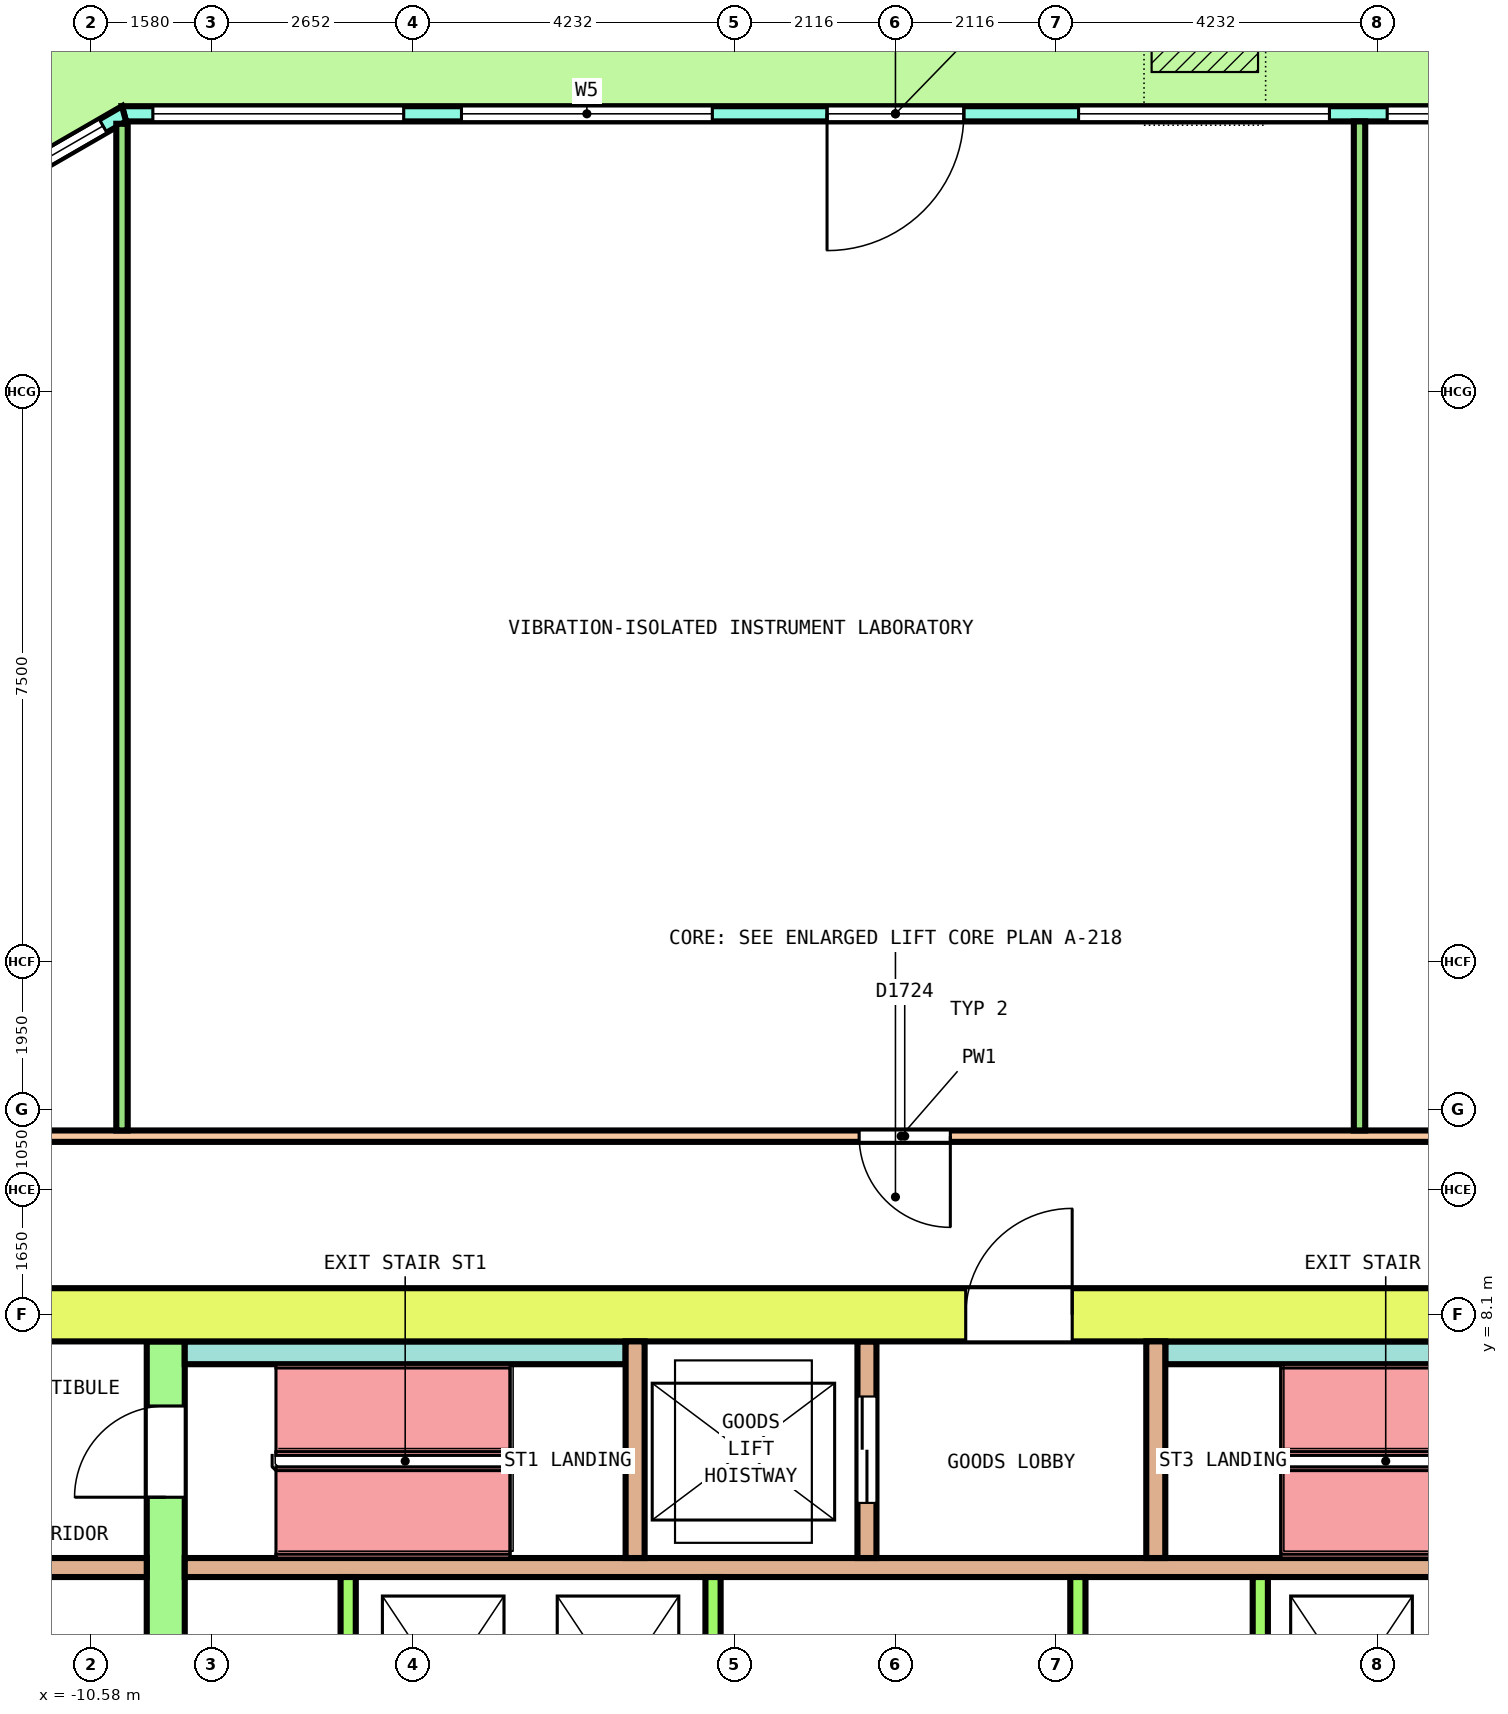
"""IFC4 building model, lengths in metres.
Left out: names, types, materials, properties, quantities, classifications, styles, units other than length and angle.
Written with IfcOpenShell. Run it as: python <this file> out.ifc"""

import sys

from ifc_helpers import new_model, si_unit, direction, frame, frame_2d, origin, place, context, subcontext, project, spatial, polyline, rectangle, outline, extrude, element, fill, save


model = new_model("IFC4")
c1 = context("Model", 3, precision=1e-05, world=origin(), true_north=direction((0.0, 1.0)))
c2 = subcontext(c1, "Body", "Model", "MODEL_VIEW")
j1 = project(units=[si_unit("LENGTHUNIT", "METRE"), si_unit("PLANEANGLEUNIT", "RADIAN")], contexts=[c1])
p1 = place(None, origin())
s1 = spatial("IfcSite", under=j1, at=p1, CompositionType="ELEMENT")
p2 = place(p1, origin())
s2 = spatial("IfcBuilding", under=s1, at=p2, CompositionType="ELEMENT")
p3 = place(p2, frame((0.0, 0.0, 154.0)))
s3 = spatial("IfcBuildingStorey", under=s2, at=p3, CompositionType="ELEMENT", Elevation=154.0)
p4 = place(p3, frame((10.149, 23.9, 0.0), z_axis=(0.0, 0.0, 1.0), x_axis=(-1.0, 0.0, 0.0)))
e1 = element("IfcWall", 1, at=p4, inside=s3, PredefinedType="SOLIDWALL", context=c2, shape_type="SweptSolid", body=[
    extrude(outline(polyline([(-0.027, -0.1), (0.991, -0.1), (2.008, -0.1), (3.026, -0.1), (4.043, -0.1), (5.061, -0.1), (6.079, -0.1), (7.096, -0.1), (8.114, -0.1), (9.131, -0.1), (10.149, -0.1), (11.167, -0.1), (12.184, -0.1), (13.202, -0.1), (14.219, -0.1), (15.237, -0.1), (16.254, -0.1), (17.272, -0.1), (18.29, -0.1), (19.307, -0.1), (20.325, -0.1), (20.271, 0.1), (19.259, 0.1), (18.247, 0.1), (17.234, 0.1), (16.222, 0.1), (15.21, 0.1), (14.198, 0.1), (13.186, 0.1), (12.173, 0.1), (11.161, 0.1), (10.149, 0.1), (9.137, 0.1), (8.125, 0.1), (7.112, 0.1), (6.1, 0.1), (5.088, 0.1), (4.076, 0.1), (3.063, 0.1), (2.051, 0.1), (1.039, 0.1), (0.027, 0.1), (-0.027, -0.1)])), origin(), (0.0, 0.0, 1.0), 4.1),
])
p5 = place(p4, frame((0.38, 0.0, 0.1)))
e2 = element("IfcOpeningElement", 2, at=p5, cuts=e1, PredefinedType="OPENING", context=c2, shape_type="SweptSolid", body=[
    extrude(rectangle(XDim=3.3, YDim=2.9, at=frame_2d((1.65, 1.45))), frame((0.0, 0.11, 0.0), z_axis=(0.0, -1.0, 0.0), x_axis=(1.0, 0.0, 0.0)), (0.0, 0.0, 1.0), 0.22),
])
p6 = place(p4, frame((4.439, 0.0, 0.1)))
e3 = element("IfcOpeningElement", 3, at=p6, cuts=e1, PredefinedType="OPENING", context=c2, shape_type="SweptSolid", body=[
    extrude(rectangle(XDim=3.3, YDim=2.9, at=frame_2d((1.65, 1.45))), frame((0.0, 0.11, 0.0), z_axis=(0.0, -1.0, 0.0), x_axis=(1.0, 0.0, 0.0)), (0.0, 0.0, 1.0), 0.22),
])
p7 = place(p4, frame((9.249, 0.0, 0.0)))
e4 = element("IfcOpeningElement", 4, at=p7, cuts=e1, PredefinedType="OPENING", context=c2, shape_type="SweptSolid", body=[
    extrude(rectangle(XDim=1.8, YDim=2.4, at=frame_2d((0.9, 1.2))), frame((0.0, 0.11, 0.0), z_axis=(0.0, -1.0, 0.0), x_axis=(1.0, 0.0, 0.0)), (0.0, 0.0, 1.0), 0.22),
])
p8 = place(p4, frame((9.249, 0.0, 2.55)))
e5 = element("IfcOpeningElement", 5, at=p8, cuts=e1, PredefinedType="OPENING", context=c2, shape_type="SweptSolid", body=[
    extrude(rectangle(XDim=1.8, YDim=0.45, at=frame_2d((0.9, 0.225))), frame((0.0, 0.11, 0.0), z_axis=(0.0, -1.0, 0.0), x_axis=(1.0, 0.0, 0.0)), (0.0, 0.0, 1.0), 0.22),
])
p9 = place(p4, frame((12.559, 0.0, 0.1)))
e6 = element("IfcOpeningElement", 6, at=p9, cuts=e1, PredefinedType="OPENING", context=c2, shape_type="SweptSolid", body=[
    extrude(rectangle(XDim=3.3, YDim=2.9, at=frame_2d((1.65, 1.45))), frame((0.0, 0.11, 0.0), z_axis=(0.0, -1.0, 0.0), x_axis=(1.0, 0.0, 0.0)), (0.0, 0.0, 1.0), 0.22),
])
p10 = place(p4, frame((16.618, 0.0, 0.1)))
e7 = element("IfcOpeningElement", 7, at=p10, cuts=e1, PredefinedType="OPENING", context=c2, shape_type="SweptSolid", body=[
    extrude(rectangle(XDim=3.3, YDim=2.9, at=frame_2d((1.65, 1.45))), frame((0.0, 0.11, 0.0), z_axis=(0.0, -1.0, 0.0), x_axis=(1.0, 0.0, 0.0)), (0.0, 0.0, 1.0), 0.22),
])
p11 = place(p3, frame((-10.149, 23.9, 0.0), z_axis=(0.0, 0.0, 1.0), x_axis=(-0.866029458321, -0.49999297727, 0.0)))
e8 = element("IfcWall", 8, at=p11, inside=s3, PredefinedType="SOLIDWALL", context=c2, shape_type="SweptSolid", body=[
    extrude(outline(polyline([(-0.027, -0.1), (1.128, -0.1), (2.282, -0.1), (3.437, -0.1), (4.592, -0.1), (5.747, -0.1), (6.901, -0.1), (6.848, 0.1), (5.711, 0.1), (4.574, 0.1), (3.437, 0.1), (2.301, 0.1), (1.164, 0.1), (0.027, 0.1), (-0.027, -0.1)])), origin(), (0.0, 0.0, 1.0), 4.1),
])
p12 = place(p11, frame((0.319, 0.0, 0.1)))
e9 = element("IfcOpeningElement", 9, at=p12, cuts=e8, PredefinedType="OPENING", context=c2, shape_type="SweptSolid", body=[
    extrude(rectangle(XDim=2.8, YDim=2.9, at=frame_2d((1.4, 1.45))), frame((0.0, 0.11, 0.0), z_axis=(0.0, -1.0, 0.0), x_axis=(1.0, 0.0, 0.0)), (0.0, 0.0, 1.0), 0.22),
])
p13 = place(p11, frame((3.756, 0.0, 0.1)))
e10 = element("IfcOpeningElement", 10, at=p13, cuts=e8, PredefinedType="OPENING", context=c2, shape_type="SweptSolid", body=[
    extrude(rectangle(XDim=2.8, YDim=2.9, at=frame_2d((1.4, 1.45))), frame((0.0, 0.11, 0.0), z_axis=(0.0, -1.0, 0.0), x_axis=(1.0, 0.0, 0.0)), (0.0, 0.0, 1.0), 0.22),
])
p14 = place(p3, frame((-13.55, 8.1, 0.0), z_axis=(0.0, 0.0, 1.0), x_axis=(1.0, 0.0, 0.0)))
e11 = element("IfcWall", 11, at=p14, inside=s3, PredefinedType="SHEAR", context=c2, shape_type="SweptSolid", body=[
    extrude(rectangle(XDim=27.1, YDim=0.7, at=frame_2d((13.55, 0.0))), origin(), (0.0, 0.0, 1.0), 4.1),
])
p15 = place(p14, frame((14.475, 0.0, 0.0)))
e12 = element("IfcOpeningElement", 12, at=p15, cuts=e11, PredefinedType="OPENING", context=c2, shape_type="SweptSolid", body=[
    extrude(rectangle(XDim=1.4, YDim=2.1, at=frame_2d((0.7, 1.05))), frame((0.0, 0.36, 0.0), z_axis=(0.0, -1.0, 0.0), x_axis=(1.0, 0.0, 0.0)), (0.0, 0.0, 1.0), 0.72),
])
p16 = place(p3, frame((-9.6, -7.75, 0.0), z_axis=(0.0, 0.0, 1.0), x_axis=(0.0, 1.0, 0.0)))
e13 = element("IfcWall", 13, at=p16, inside=s3, PredefinedType="SHEAR", context=c2, shape_type="SweptSolid", body=[
    extrude(rectangle(XDim=15.5, YDim=0.5, at=frame_2d((7.75, 0.0))), origin(), (0.0, 0.0, 1.0), 4.1),
])
p17 = place(p16, frame((6.55, 0.0, 0.0)))
e14 = element("IfcOpeningElement", 14, at=p17, cuts=e13, PredefinedType="OPENING", context=c2, shape_type="SweptSolid", body=[
    extrude(rectangle(XDim=2.4, YDim=2.1, at=frame_2d((1.2, 1.05))), frame((0.0, 0.26, 0.0), z_axis=(0.0, -1.0, 0.0), x_axis=(1.0, 0.0, 0.0)), (0.0, 0.0, 1.0), 0.52),
])
p18 = place(p16, frame((13.45, 0.0, 0.0)))
e15 = element("IfcOpeningElement", 15, at=p18, cuts=e13, PredefinedType="OPENING", context=c2, shape_type="SweptSolid", body=[
    extrude(rectangle(XDim=1.2, YDim=2.1, at=frame_2d((0.6, 1.05))), frame((0.0, 0.26, 0.0), z_axis=(0.0, -1.0, 0.0), x_axis=(1.0, 0.0, 0.0)), (0.0, 0.0, 1.0), 0.52),
])
p19 = place(p16, frame((0.85, 0.0, 0.0)))
e16 = element("IfcOpeningElement", 16, at=p19, cuts=e13, PredefinedType="OPENING", context=c2, shape_type="SweptSolid", body=[
    extrude(rectangle(XDim=1.2, YDim=2.1, at=frame_2d((0.6, 1.05))), frame((0.0, 0.26, 0.0), z_axis=(0.0, -1.0, 0.0), x_axis=(1.0, 0.0, 0.0)), (0.0, 0.0, 1.0), 0.52),
])
p20 = place(p3, frame((-12.85, 4.775, 0.0), z_axis=(0.0, 0.0, 1.0), x_axis=(1.0, 0.0, 0.0)))
e17 = element("IfcWall", 17, at=p20, inside=s3, PredefinedType="SOLIDWALL", context=c2, shape_type="SweptSolid", body=[
    extrude(rectangle(XDim=3.0, YDim=0.25, at=frame_2d((1.5, 0.0))), origin(), (0.0, 0.0, 1.0), 4.1),
])
p21 = place(p3, frame((-9.35, 4.775, 0.0), z_axis=(0.0, 0.0, 1.0), x_axis=(1.0, 0.0, 0.0)))
e18 = element("IfcWall", 18, at=p21, inside=s3, PredefinedType="SOLIDWALL", context=c2, shape_type="SweptSolid", body=[
    extrude(rectangle(XDim=18.7, YDim=0.25, at=frame_2d((9.35, 0.0))), origin(), (0.0, 0.0, 1.0), 4.1),
])
for number, where, z_axis, x_axis in (
    (19, (-7.2, 1.75, 0.0), (0.0, 0.0, 1.0), (0.0, 1.0, 0.0)),
    (20, (-2.4, 1.75, 0.0), (0.0, 0.0, 1.0), (0.0, 1.0, 0.0)),
    (21, (2.4, 1.75, 0.0), (0.0, 0.0, 1.0), (0.0, 1.0, 0.0)),
    (22, (4.8, 1.75, 0.0), (0.0, 0.0, 1.0), (0.0, 1.0, 0.0)),
):
    element("IfcWall", number, at=place(p3, frame(where, z_axis=z_axis, x_axis=x_axis)), inside=s3, PredefinedType="SOLIDWALL", context=c2, shape_type="SweptSolid", body=[
        extrude(rectangle(XDim=2.9, YDim=0.2, at=frame_2d((1.45, 0.0))), origin(), (0.0, 0.0, 1.0), 4.1),
    ])
for number, where, z_axis, x_axis in (
    (23, (-9.35, 7.6, 0.0), (0.0, 0.0, 1.0), (1.0, 0.0, 0.0)),
    (24, (3.55, 7.6, 0.0), (0.0, 0.0, 1.0), (1.0, 0.0, 0.0)),
):
    element("IfcWall", number, at=place(p3, frame(where, z_axis=z_axis, x_axis=x_axis)), inside=s3, PredefinedType="SOLIDWALL", context=c2, shape_type="SweptSolid", body=[
        extrude(rectangle(XDim=5.8, YDim=0.3, at=frame_2d((2.9, 0.0))), origin(), (0.0, 0.0, 1.0), 4.1),
    ])
p22 = place(p3, frame((-3.425, 4.9, 0.0), z_axis=(0.0, 0.0, 1.0), x_axis=(0.0, 1.0, 0.0)))
e25 = element("IfcWall", 25, at=p22, inside=s3, PredefinedType="SOLIDWALL", context=c2, shape_type="SweptSolid", body=[
    extrude(rectangle(XDim=2.85, YDim=0.25, at=frame_2d((1.425, 0.0))), origin(), (0.0, 0.0, 1.0), 4.1),
])
p23 = place(p3, frame((-0.375, 4.9, 0.0), z_axis=(0.0, 0.0, 1.0), x_axis=(0.0, 1.0, 0.0)))
e26 = element("IfcWall", 26, at=p23, inside=s3, PredefinedType="SOLIDWALL", context=c2, shape_type="SweptSolid", body=[
    extrude(rectangle(XDim=2.85, YDim=0.25, at=frame_2d((1.425, 0.0))), origin(), (0.0, 0.0, 1.0), 4.1),
])
p24 = place(p23, frame((0.725, 0.0, 0.0)))
e27 = element("IfcOpeningElement", 27, at=p24, cuts=e26, PredefinedType="OPENING", context=c2, shape_type="SweptSolid", body=[
    extrude(rectangle(XDim=1.4, YDim=2.1, at=frame_2d((0.7, 1.05))), frame((0.0, 0.135, 0.0), z_axis=(0.0, -1.0, 0.0), x_axis=(1.0, 0.0, 0.0)), (0.0, 0.0, 1.0), 0.27),
])
p25 = place(p3, frame((3.425, 4.9, 0.0), z_axis=(0.0, 0.0, 1.0), x_axis=(0.0, 1.0, 0.0)))
e28 = element("IfcWall", 28, at=p25, inside=s3, PredefinedType="SOLIDWALL", context=c2, shape_type="SweptSolid", body=[
    extrude(rectangle(XDim=2.85, YDim=0.25, at=frame_2d((1.425, 0.0))), origin(), (0.0, 0.0, 1.0), 4.1),
])
p26 = place(p3, frame((-15.475, 10.45, 0.0), z_axis=(0.0, 0.0, 1.0), x_axis=(1.0, 0.0, 0.0)))
e29 = element("IfcWall", 29, at=p26, inside=s3, PredefinedType="PARTITIONING", context=c2, shape_type="SweptSolid", body=[
    extrude(rectangle(XDim=31.1, YDim=0.15, at=frame_2d((15.55, 0.0))), origin(), (0.0, 0.0, 1.0), 3.05),
])
p27 = place(p26, frame((25.808, 0.0, 0.0)))
e30 = element("IfcOpeningElement", 30, at=p27, cuts=e29, PredefinedType="OPENING", context=c2, shape_type="SweptSolid", body=[
    extrude(rectangle(XDim=1.2, YDim=2.1, at=frame_2d((0.6, 1.05))), frame((0.0, 0.085, 0.0), z_axis=(0.0, -1.0, 0.0), x_axis=(1.0, 0.0, 0.0)), (0.0, 0.0, 1.0), 0.17),
])
p28 = place(p26, frame((14.997, 0.0, 0.0)))
e31 = element("IfcOpeningElement", 31, at=p28, cuts=e29, PredefinedType="OPENING", context=c2, shape_type="SweptSolid", body=[
    extrude(rectangle(XDim=1.2, YDim=2.1, at=frame_2d((0.6, 1.05))), frame((0.0, 0.085, 0.0), z_axis=(0.0, -1.0, 0.0), x_axis=(1.0, 0.0, 0.0)), (0.0, 0.0, 1.0), 0.17),
])
p29 = place(p26, frame((2.533, 0.0, 0.0)))
e32 = element("IfcOpeningElement", 32, at=p29, cuts=e29, PredefinedType="OPENING", context=c2, shape_type="SweptSolid", body=[
    extrude(rectangle(XDim=1.2, YDim=2.1, at=frame_2d((0.6, 1.05))), frame((0.0, 0.085, 0.0), z_axis=(0.0, -1.0, 0.0), x_axis=(1.0, 0.0, 0.0)), (0.0, 0.0, 1.0), 0.17),
])
p30 = place(p3, frame((6.105, 10.525, 0.0), z_axis=(0.0, 0.0, 1.0), x_axis=(0.0, 1.0, 0.0)))
e33 = element("IfcWall", 33, at=p30, inside=s3, PredefinedType="PARTITIONING", context=c2, shape_type="SweptSolid", body=[
    extrude(rectangle(XDim=13.275, YDim=0.15, at=frame_2d((6.638, 0.0))), origin(), (0.0, 0.0, 1.0), 3.05),
])
p31 = place(p3, frame((-10.176, 10.525, 0.0), z_axis=(0.0, 0.0, 1.0), x_axis=(0.0, 1.0, 0.0)))
e34 = element("IfcWall", 34, at=p31, inside=s3, PredefinedType="PARTITIONING", context=c2, shape_type="SweptSolid", body=[
    extrude(rectangle(XDim=13.244, YDim=0.15, at=frame_2d((6.622, 0.0))), origin(), (0.0, 0.0, 1.0), 3.05),
])
p32 = place(p5, origin())
e35 = element("IfcWindow", 35, at=p32, inside=s3, PartitioningType="SINGLE_PANEL", PredefinedType="WINDOW", context=c2, shape_type="SweptSolid", body=[
    extrude(rectangle(XDim=3.3, YDim=2.9, at=frame_2d((1.65, 1.45))), frame((0.0, 0.03, 0.0), z_axis=(0.0, -1.0, 0.0), x_axis=(1.0, 0.0, 0.0)), (0.0, 0.0, 1.0), 0.06),
])
fill(e2, e35)
p33 = place(p6, origin())
e36 = element("IfcWindow", 36, at=p33, inside=s3, PartitioningType="SINGLE_PANEL", PredefinedType="WINDOW", context=c2, shape_type="SweptSolid", body=[
    extrude(rectangle(XDim=3.3, YDim=2.9, at=frame_2d((1.65, 1.45))), frame((0.0, 0.03, 0.0), z_axis=(0.0, -1.0, 0.0), x_axis=(1.0, 0.0, 0.0)), (0.0, 0.0, 1.0), 0.06),
])
fill(e3, e36)
p34 = place(p7, origin())
e37 = element("IfcDoor", 37, at=p34, inside=s3, OperationType="DOUBLE_DOOR_SINGLE_SWING", PredefinedType="DOOR", context=c2, shape_type="SweptSolid", body=[
    extrude(rectangle(XDim=1.8, YDim=2.4, at=frame_2d((0.9, 1.2))), frame((0.0, 0.025, 0.0), z_axis=(0.0, -1.0, 0.0), x_axis=(1.0, 0.0, 0.0)), (0.0, 0.0, 1.0), 0.05),
])
fill(e4, e37)
p35 = place(p8, origin())
e38 = element("IfcWindow", 38, at=p35, inside=s3, PartitioningType="SINGLE_PANEL", PredefinedType="WINDOW", context=c2, shape_type="SweptSolid", body=[
    extrude(rectangle(XDim=1.8, YDim=0.45, at=frame_2d((0.9, 0.225))), frame((0.0, 0.03, 0.0), z_axis=(0.0, -1.0, 0.0), x_axis=(1.0, 0.0, 0.0)), (0.0, 0.0, 1.0), 0.06),
])
fill(e5, e38)
p36 = place(p9, origin())
e39 = element("IfcWindow", 39, at=p36, inside=s3, PartitioningType="SINGLE_PANEL", PredefinedType="WINDOW", context=c2, shape_type="SweptSolid", body=[
    extrude(rectangle(XDim=3.3, YDim=2.9, at=frame_2d((1.65, 1.45))), frame((0.0, 0.03, 0.0), z_axis=(0.0, -1.0, 0.0), x_axis=(1.0, 0.0, 0.0)), (0.0, 0.0, 1.0), 0.06),
])
fill(e6, e39)
p37 = place(p10, origin())
e40 = element("IfcWindow", 40, at=p37, inside=s3, PartitioningType="SINGLE_PANEL", PredefinedType="WINDOW", context=c2, shape_type="SweptSolid", body=[
    extrude(rectangle(XDim=3.3, YDim=2.9, at=frame_2d((1.65, 1.45))), frame((0.0, 0.03, 0.0), z_axis=(0.0, -1.0, 0.0), x_axis=(1.0, 0.0, 0.0)), (0.0, 0.0, 1.0), 0.06),
])
fill(e7, e40)
p38 = place(p12, origin())
e41 = element("IfcWindow", 41, at=p38, inside=s3, PartitioningType="SINGLE_PANEL", PredefinedType="WINDOW", context=c2, shape_type="SweptSolid", body=[
    extrude(rectangle(XDim=2.8, YDim=2.9, at=frame_2d((1.4, 1.45))), frame((0.0, 0.03, 0.0), z_axis=(0.0, -1.0, 0.0), x_axis=(1.0, 0.0, 0.0)), (0.0, 0.0, 1.0), 0.06),
])
fill(e9, e41)
p39 = place(p24, origin())
e42 = element("IfcDoor", 42, at=p39, inside=s3, OperationType="DOUBLE_DOOR_SLIDING", PredefinedType="DOOR", context=c2, shape_type="SweptSolid", body=[
    extrude(rectangle(XDim=1.4, YDim=2.1, at=frame_2d((0.7, 1.05))), frame((0.0, 0.075, 0.0), z_axis=(0.0, -1.0, 0.0), x_axis=(1.0, 0.0, 0.0)), (0.0, 0.0, 1.0), 0.15),
])
fill(e27, e42)
p40 = place(p18, origin())
e43 = element("IfcDoor", 43, at=p40, inside=s3, OperationType="SINGLE_SWING_RIGHT", PredefinedType="DOOR", context=c2, shape_type="SweptSolid", body=[
    extrude(rectangle(XDim=1.2, YDim=2.1, at=frame_2d((0.6, 1.05))), frame((0.0, 0.2, 0.0), z_axis=(0.0, -1.0, 0.0), x_axis=(1.0, 0.0, 0.0)), (0.0, 0.0, 1.0), 0.4),
])
fill(e15, e43)
p41 = place(p15, origin())
e44 = element("IfcDoor", 44, at=p41, inside=s3, OperationType="DOUBLE_DOOR_SINGLE_SWING", PredefinedType="DOOR", context=c2, shape_type="SweptSolid", body=[
    extrude(rectangle(XDim=1.4, YDim=2.1, at=frame_2d((0.7, 1.05))), frame((0.0, 0.3, 0.0), z_axis=(0.0, -1.0, 0.0), x_axis=(1.0, 0.0, 0.0)), (0.0, 0.0, 1.0), 0.6),
])
fill(e12, e44)
p42 = place(p28, origin())
e45 = element("IfcDoor", 45, at=p42, inside=s3, OperationType="DOUBLE_DOOR_SINGLE_SWING", PredefinedType="DOOR", context=c2, shape_type="SweptSolid", body=[
    extrude(rectangle(XDim=1.2, YDim=2.1, at=frame_2d((0.6, 1.05))), frame((0.0, 0.025, 0.0), z_axis=(0.0, -1.0, 0.0), x_axis=(1.0, 0.0, 0.0)), (0.0, 0.0, 1.0), 0.05),
])
fill(e31, e45)
save(model, sys.argv[1])
